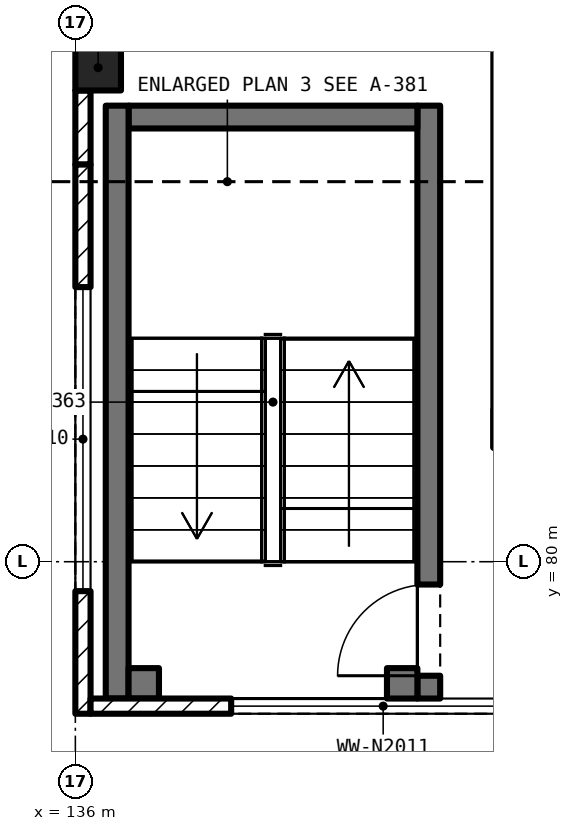
"""IFC4 building model, lengths in metres.
Left out: names, types, materials, properties, quantities, classifications, styles, units other than length and angle.
Written with IfcOpenShell. Run it as: python <this file> out.ifc"""

import sys

from ifc_helpers import new_model, si_unit, direction, frame, frame_2d, origin, origin_2d, place, context, subcontext, project, spatial, rectangle, extrude, element, fill, save


model = new_model("IFC4")
c1 = context("Model", 3, precision=1e-05, world=origin(), true_north=direction((0.0, 1.0)))
c2 = subcontext(c1, "Body", "Model", "MODEL_VIEW")
j1 = project(units=[si_unit("LENGTHUNIT", "METRE"), si_unit("PLANEANGLEUNIT", "RADIAN")], contexts=[c1])
p1 = place(None, origin())
s1 = spatial("IfcSite", under=j1, at=p1, CompositionType="ELEMENT")
p2 = place(p1, origin())
s2 = spatial("IfcBuilding", under=s1, at=p2, CompositionType="ELEMENT")
p3 = place(p2, frame((0.0, 0.0, 6.0)))
s3 = spatial("IfcBuildingStorey", under=s2, at=p3, CompositionType="ELEMENT", Elevation=6.0)
p4 = place(p3, frame((136.3, 86.5, 0.0), z_axis=(0.0, 0.0, 1.0), x_axis=(1.0, 0.0, 0.0)))
e1 = element("IfcColumn", 1, at=p4, inside=s3, PredefinedType="COLUMN", context=c2, shape_type="SweptSolid", body=[
    extrude(rectangle(XDim=0.6, YDim=0.6, at=origin_2d()), origin(), (0.0, 0.0, 1.0), 5.5),
])
p5 = place(p3, frame((136.1, 86.2, 0.0), z_axis=(0.0, 0.0, 1.0), x_axis=(0.0, -1.0, 0.0)))
e2 = element("IfcWall", 2, at=p5, inside=s3, PredefinedType="SOLIDWALL", context=c2, shape_type="SweptSolid", body=[
    extrude(rectangle(XDim=0.975, YDim=0.2, at=frame_2d((0.487, 0.0))), origin(), (0.0, 0.0, 1.0), 4.55),
])
p6 = place(p3, frame((136.1, 85.225, 0.0), z_axis=(0.0, 0.0, 1.0), x_axis=(0.0, -1.0, 0.0)))
e3 = element("IfcWall", 3, at=p6, inside=s3, PredefinedType="SOLIDWALL", context=c2, shape_type="SweptSolid", body=[
    extrude(rectangle(XDim=7.225, YDim=0.2, at=frame_2d((3.613, 0.0))), origin(), (0.0, 0.0, 1.0), 4.55),
])
p7 = place(p6, frame((1.612, 0.0, 1.0)))
e4 = element("IfcOpeningElement", 4, at=p7, cuts=e3, PredefinedType="OPENING", context=c2, shape_type="SweptSolid", body=[
    extrude(rectangle(XDim=4.0, YDim=1.8, at=frame_2d((2.0, 0.9))), frame((0.0, 0.112, 0.0), z_axis=(0.0, -1.0, 0.0), x_axis=(1.0, 0.0, 0.0)), (0.0, 0.0, 1.0), 0.224),
])
p8 = place(p3, frame((136.2, 78.1, 0.0), z_axis=(0.0, 0.0, 1.0), x_axis=(1.0, 0.0, 0.0)))
e5 = element("IfcWall", 5, at=p8, inside=s3, PredefinedType="SOLIDWALL", context=c2, shape_type="SweptSolid", body=[
    extrude(rectangle(XDim=7.7, YDim=0.2, at=frame_2d((3.85, 0.0))), origin(), (0.0, 0.0, 1.0), 4.55),
])
p9 = place(p8, frame((1.85, 0.0, 1.0)))
e6 = element("IfcOpeningElement", 6, at=p9, cuts=e5, PredefinedType="OPENING", context=c2, shape_type="SweptSolid", body=[
    extrude(rectangle(XDim=4.0, YDim=1.8, at=frame_2d((2.0, 0.9))), frame((0.0, 0.112, 0.0), z_axis=(0.0, -1.0, 0.0), x_axis=(1.0, 0.0, 0.0)), (0.0, 0.0, 1.0), 0.224),
])
p10 = place(p3, frame((140.65, 78.2, 0.0), z_axis=(0.0, 0.0, 1.0), x_axis=(0.0, 1.0, 0.0)))
e7 = element("IfcWall", 7, at=p10, inside=s3, PredefinedType="SOLIDWALL", context=c2, shape_type="SweptSolid", body=[
    extrude(rectangle(XDim=7.8, YDim=0.3, at=frame_2d((3.9, 0.0))), origin(), (0.0, 0.0, 1.0), 5.5),
])
p11 = place(p10, frame((0.3, 0.0, 0.0)))
e8 = element("IfcOpeningElement", 8, at=p11, cuts=e7, PredefinedType="OPENING", context=c2, shape_type="SweptSolid", body=[
    extrude(rectangle(XDim=1.2, YDim=2.1, at=frame_2d((0.6, 1.05))), frame((0.0, 0.162, 0.0), z_axis=(0.0, -1.0, 0.0), x_axis=(1.0, 0.0, 0.0)), (0.0, 0.0, 1.0), 0.324),
])
p12 = place(p3, frame((140.5, 85.85, 0.0), z_axis=(0.0, 0.0, 1.0), x_axis=(-1.0, 0.0, 0.0)))
e9 = element("IfcWall", 9, at=p12, inside=s3, PredefinedType="SOLIDWALL", context=c2, shape_type="SweptSolid", body=[
    extrude(rectangle(XDim=3.8, YDim=0.3, at=frame_2d((1.9, 0.0))), origin(), (0.0, 0.0, 1.0), 5.5),
])
p13 = place(p3, frame((136.55, 86.0, 0.0), z_axis=(0.0, 0.0, 1.0), x_axis=(0.0, -1.0, 0.0)))
e10 = element("IfcWall", 10, at=p13, inside=s3, PredefinedType="SOLIDWALL", context=c2, shape_type="SweptSolid", body=[
    extrude(rectangle(XDim=7.8, YDim=0.3, at=frame_2d((3.9, 0.0))), origin(), (0.0, 0.0, 1.0), 5.5),
])
p14 = place(p3, frame((136.7, 78.4, 0.0), z_axis=(0.0, 0.0, 1.0), x_axis=(1.0, 0.0, 0.0)))
e11 = element("IfcWall", 11, at=p14, inside=s3, PredefinedType="SOLIDWALL", context=c2, shape_type="SweptSolid", body=[
    extrude(rectangle(XDim=0.4, YDim=0.4, at=frame_2d((0.2, 0.0))), origin(), (0.0, 0.0, 1.0), 5.5),
])
p15 = place(p3, frame((140.1, 78.4, 0.0), z_axis=(0.0, 0.0, 1.0), x_axis=(1.0, 0.0, 0.0)))
e12 = element("IfcWall", 12, at=p15, inside=s3, PredefinedType="SOLIDWALL", context=c2, shape_type="SweptSolid", body=[
    extrude(rectangle(XDim=0.4, YDim=0.4, at=frame_2d((0.2, 0.0))), origin(), (0.0, 0.0, 1.0), 5.5),
])
p16 = place(p7, origin())
e13 = element("IfcWindow", 13, at=p16, inside=s3, PartitioningType="DOUBLE_PANEL_VERTICAL", PredefinedType="WINDOW", context=c2, shape_type="SweptSolid", body=[
    extrude(rectangle(XDim=4.0, YDim=1.8, at=frame_2d((2.0, 0.9))), frame((0.0, 0.03, 0.0), z_axis=(0.0, -1.0, 0.0), x_axis=(1.0, 0.0, 0.0)), (0.0, 0.0, 1.0), 0.06),
])
fill(e4, e13)
p17 = place(p9, origin())
e14 = element("IfcWindow", 14, at=p17, inside=s3, PartitioningType="DOUBLE_PANEL_VERTICAL", PredefinedType="WINDOW", context=c2, shape_type="SweptSolid", body=[
    extrude(rectangle(XDim=4.0, YDim=1.8, at=frame_2d((2.0, 0.9))), frame((0.0, 0.03, 0.0), z_axis=(0.0, -1.0, 0.0), x_axis=(1.0, 0.0, 0.0)), (0.0, 0.0, 1.0), 0.06),
])
fill(e6, e14)
p18 = place(p11, origin())
e15 = element("IfcDoor", 15, at=p18, inside=s3, OperationType="SINGLE_SWING_LEFT", PredefinedType="DOOR", context=c2, shape_type="SweptSolid", body=[
    extrude(rectangle(XDim=1.2, YDim=2.1, at=frame_2d((0.6, 1.05))), frame((0.0, 0.025, 0.0), z_axis=(0.0, -1.0, 0.0), x_axis=(1.0, 0.0, 0.0)), (0.0, 0.0, 1.0), 0.05),
])
fill(e8, e15)
save(model, sys.argv[1])
